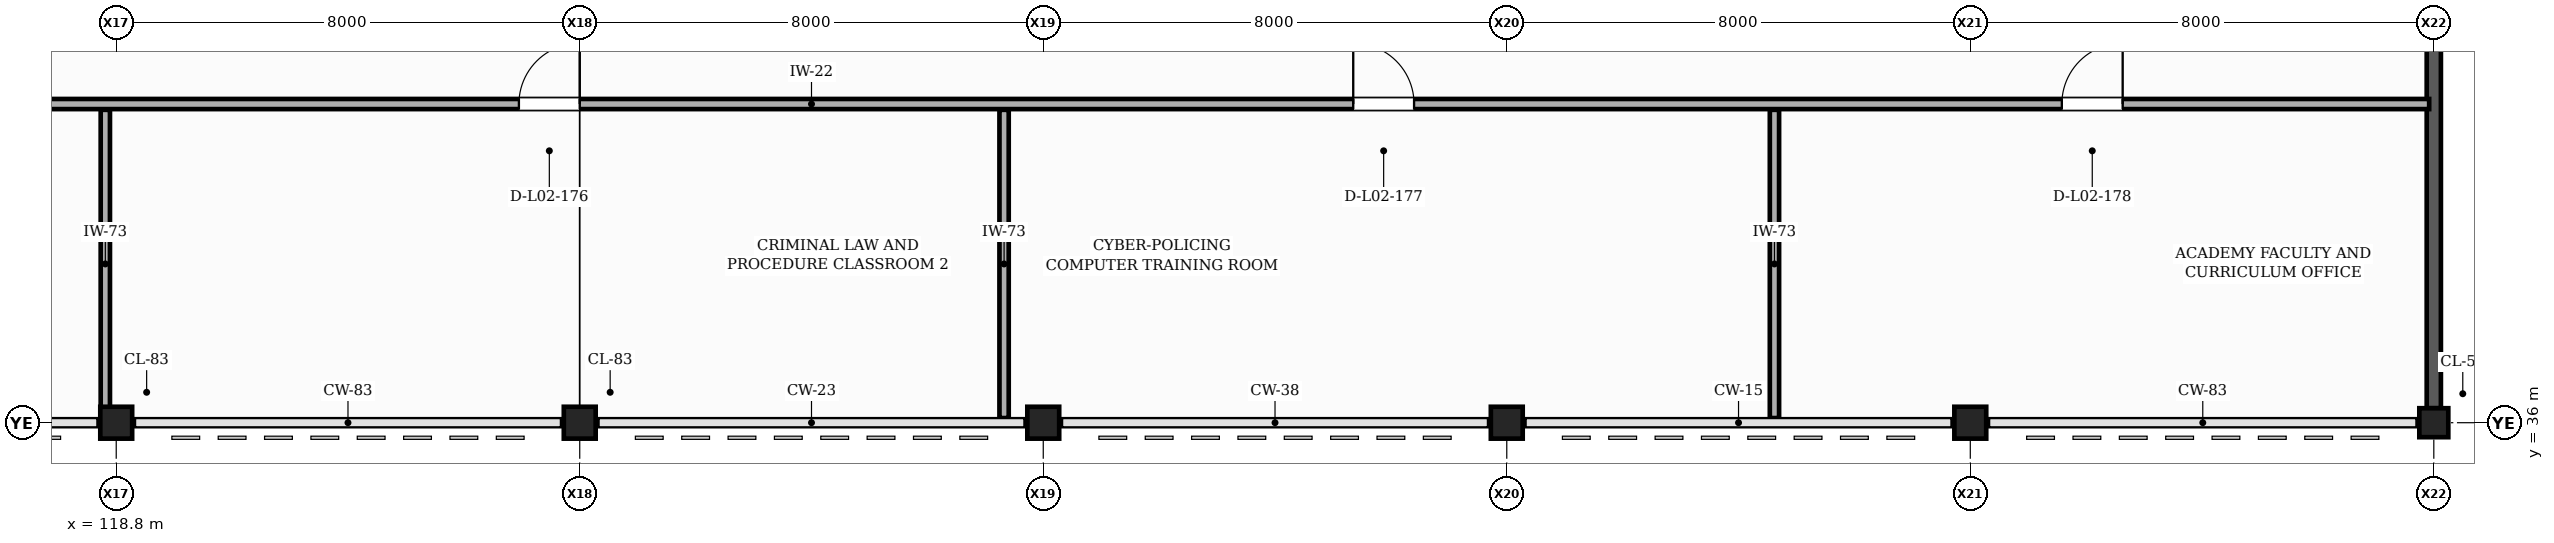
"""IFC4 building model, lengths in metres.
Left out: names, types, materials, properties, quantities, classifications, styles, units other than length and angle.
Written with IfcOpenShell. Run it as: python <this file> out.ifc"""

import sys

from ifc_helpers import new_model, si_unit, direction, frame, frame_2d, origin, origin_2d, place, context, subcontext, project, spatial, rectangle, extrude, element, fill, save


model = new_model("IFC4")
c1 = context("Model", 3, precision=1e-05, world=origin(), true_north=direction((0.0, 1.0)))
c2 = subcontext(c1, "Body", "Model", "MODEL_VIEW")
j1 = project(units=[si_unit("LENGTHUNIT", "METRE"), si_unit("PLANEANGLEUNIT", "RADIAN")], contexts=[c1])
p1 = place(None, origin())
s1 = spatial("IfcSite", under=j1, at=p1, CompositionType="ELEMENT")
p2 = place(p1, origin())
s2 = spatial("IfcBuilding", under=s1, at=p2, CompositionType="ELEMENT")
p3 = place(p2, frame((0.0, 0.0, 9.0)))
s3 = spatial("IfcBuildingStorey", under=s2, at=p3, CompositionType="ELEMENT", Elevation=9.0)
for number, where, z_axis, x_axis in (
    (1, (118.8, 36.0, 0.0), (0.0, 0.0, 1.0), (1.0, 0.0, 0.0)),
    (2, (126.8, 36.0, 0.0), (0.0, 0.0, 1.0), (1.0, 0.0, 0.0)),
    (3, (134.8, 36.0, 0.0), (0.0, 0.0, 1.0), (1.0, 0.0, 0.0)),
    (4, (142.8, 36.0, 0.0), (0.0, 0.0, 1.0), (1.0, 0.0, 0.0)),
    (5, (150.8, 36.0, 0.0), (0.0, 0.0, 1.0), (1.0, 0.0, 0.0)),
):
    element("IfcColumn", number, at=place(p3, frame(where, z_axis=z_axis, x_axis=x_axis)), inside=s3, PredefinedType="COLUMN", context=c2, shape_type="SweptSolid", body=[
        extrude(rectangle(XDim=0.55, YDim=0.55, at=origin_2d()), origin(), (0.0, 0.0, 1.0), 4.5),
    ])
p4 = place(p3, frame((158.8, 36.0, 0.0), z_axis=(0.0, 0.0, 1.0), x_axis=(1.0, 0.0, 0.0)))
e6 = element("IfcColumn", 6, at=p4, inside=s3, PredefinedType="COLUMN", context=c2, shape_type="SweptSolid", body=[
    extrude(rectangle(XDim=0.5, YDim=0.5, at=origin_2d()), origin(), (0.0, 0.0, 1.0), 4.5),
])
p5 = place(p3, frame((158.8, 36.25, 0.0), z_axis=(0.0, 0.0, 1.0), x_axis=(0.0, 1.0, 0.0)))
e7 = element("IfcWall", 7, at=p5, inside=s3, PredefinedType="SOLIDWALL", context=c2, shape_type="SweptSolid", body=[
    extrude(rectangle(XDim=7.5, YDim=0.245, at=frame_2d((3.75, 0.0))), origin(), (0.0, 0.0, 1.0), 3.57),
])
for number, where, z_axis, x_axis in (
    (8, (118.612, 36.08, 0.0), (0.0, 0.0, 1.0), (0.0, 1.0, 0.0)),
    (9, (134.124, 36.08, 0.0), (0.0, 0.0, 1.0), (0.0, 1.0, 0.0)),
    (10, (147.42, 36.08, 0.0), (0.0, 0.0, 1.0), (0.0, 1.0, 0.0)),
):
    element("IfcWall", number, at=place(p3, frame(where, z_axis=z_axis, x_axis=x_axis)), inside=s3, PredefinedType="PARTITIONING", context=c2, shape_type="SweptSolid", body=[
        extrude(rectangle(XDim=5.32, YDim=0.16, at=frame_2d((2.66, 0.0))), origin(), (0.0, 0.0, 1.0), 3.555),
    ])
p6 = place(p3, frame((102.88, 41.5, 0.0), z_axis=(0.0, 0.0, 1.0), x_axis=(1.0, 0.0, 0.0)))
e11 = element("IfcWall", 11, at=p6, inside=s3, PredefinedType="PARTITIONING", context=c2, shape_type="SweptSolid", body=[
    extrude(rectangle(XDim=55.84, YDim=0.175, at=frame_2d((27.92, 0.0))), origin(), (0.0, 0.0, 1.0), 3.555),
])
p7 = place(p6, frame((7.32, 0.0, 0.0)))
e12 = element("IfcOpeningElement", 12, at=p7, cuts=e11, PredefinedType="OPENING", context=c2, shape_type="SweptSolid", body=[
    extrude(rectangle(XDim=1.05, YDim=2.1, at=frame_2d((0.525, 1.05))), frame((0.0, 0.098, 0.0), z_axis=(0.0, -1.0, 0.0), x_axis=(1.0, 0.0, 0.0)), (0.0, 0.0, 1.0), 0.195),
])
p8 = place(p6, frame((22.87, 0.0, 0.0)))
e13 = element("IfcOpeningElement", 13, at=p8, cuts=e11, PredefinedType="OPENING", context=c2, shape_type="SweptSolid", body=[
    extrude(rectangle(XDim=1.05, YDim=2.1, at=frame_2d((0.525, 1.05))), frame((0.0, 0.098, 0.0), z_axis=(0.0, -1.0, 0.0), x_axis=(1.0, 0.0, 0.0)), (0.0, 0.0, 1.0), 0.195),
])
p9 = place(p6, frame((37.27, 0.0, 0.0)))
e14 = element("IfcOpeningElement", 14, at=p9, cuts=e11, PredefinedType="OPENING", context=c2, shape_type="SweptSolid", body=[
    extrude(rectangle(XDim=1.05, YDim=2.1, at=frame_2d((0.525, 1.05))), frame((0.0, 0.098, 0.0), z_axis=(0.0, -1.0, 0.0), x_axis=(1.0, 0.0, 0.0)), (0.0, 0.0, 1.0), 0.195),
])
p10 = place(p6, frame((49.5, 0.0, 0.0)))
e15 = element("IfcOpeningElement", 15, at=p10, cuts=e11, PredefinedType="OPENING", context=c2, shape_type="SweptSolid", body=[
    extrude(rectangle(XDim=1.05, YDim=2.1, at=frame_2d((0.525, 1.05))), frame((0.0, 0.098, 0.0), z_axis=(0.0, -1.0, 0.0), x_axis=(1.0, 0.0, 0.0)), (0.0, 0.0, 1.0), 0.195),
])
p11 = place(p8, origin())
e16 = element("IfcDoor", 16, at=p11, inside=s3, OperationType="SINGLE_SWING_RIGHT", PredefinedType="DOOR", context=c2, shape_type="SweptSolid", body=[
    extrude(rectangle(XDim=1.05, YDim=2.1, at=frame_2d((0.525, 1.05))), frame((0.0, 0.025, 0.0), z_axis=(0.0, -1.0, 0.0), x_axis=(1.0, 0.0, 0.0)), (0.0, 0.0, 1.0), 0.05),
])
fill(e13, e16)
p12 = place(p9, origin())
e17 = element("IfcDoor", 17, at=p12, inside=s3, OperationType="SINGLE_SWING_LEFT", PredefinedType="DOOR", context=c2, shape_type="SweptSolid", body=[
    extrude(rectangle(XDim=1.05, YDim=2.1, at=frame_2d((0.525, 1.05))), frame((0.0, 0.025, 0.0), z_axis=(0.0, -1.0, 0.0), x_axis=(1.0, 0.0, 0.0)), (0.0, 0.0, 1.0), 0.05),
])
fill(e14, e17)
p13 = place(p10, origin())
e18 = element("IfcDoor", 18, at=p13, inside=s3, OperationType="SINGLE_SWING_RIGHT", PredefinedType="DOOR", context=c2, shape_type="SweptSolid", body=[
    extrude(rectangle(XDim=1.05, YDim=2.1, at=frame_2d((0.525, 1.05))), frame((0.0, 0.025, 0.0), z_axis=(0.0, -1.0, 0.0), x_axis=(1.0, 0.0, 0.0)), (0.0, 0.0, 1.0), 0.05),
])
fill(e15, e18)
save(model, sys.argv[1])
